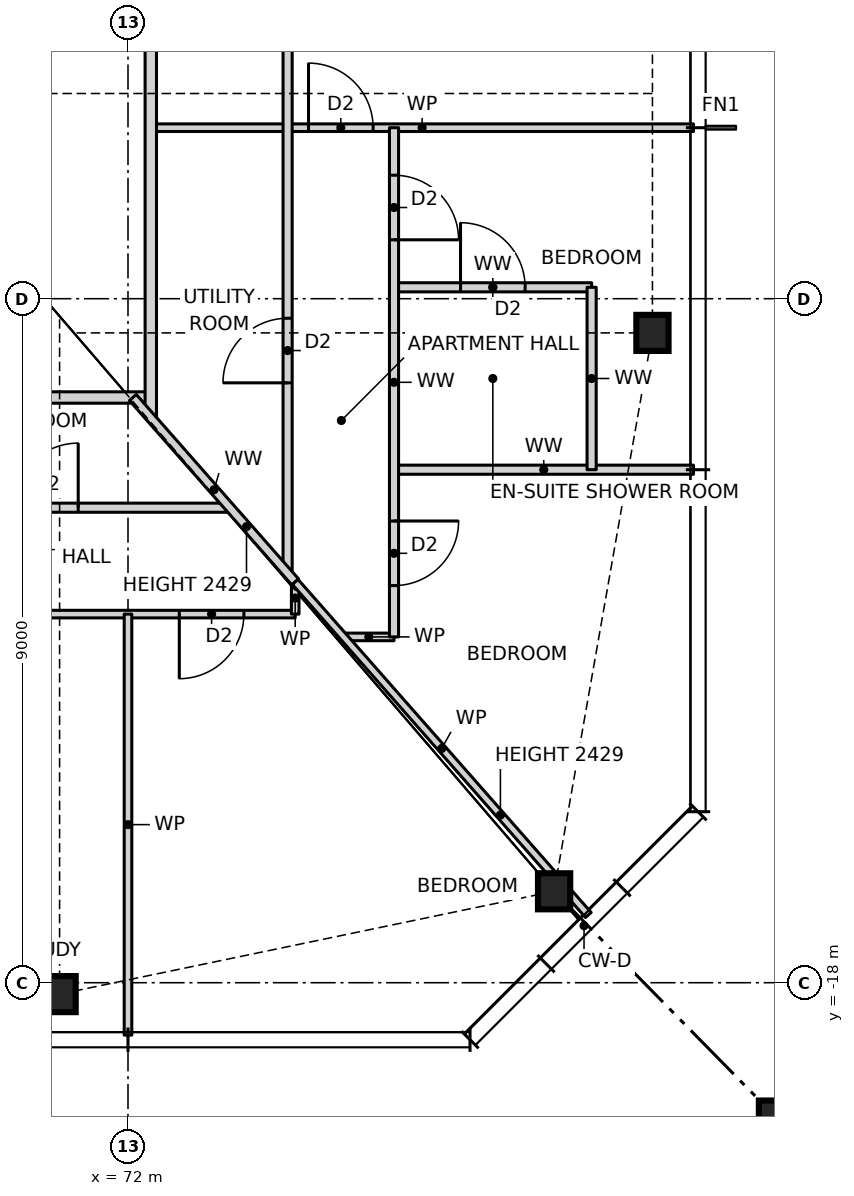
"""IFC4 building model, lengths in metres.
Left out: names, types, materials, properties, quantities, classifications, styles, units other than length and angle.
Written with IfcOpenShell. Run it as: python <this file> out.ifc"""

import sys

from ifc_helpers import new_model, si_unit, direction, frame, frame_2d, origin, origin_2d, place, context, subcontext, project, spatial, rectangle, hollow_rectangle, i_section, extrude, element, fill, save


model = new_model("IFC4")
c1 = context("Model", 3, precision=1e-05, world=origin(), true_north=direction((0.0, 1.0)))
c2 = subcontext(c1, "Body", "Model", "MODEL_VIEW")
j1 = project(units=[si_unit("LENGTHUNIT", "METRE"), si_unit("PLANEANGLEUNIT", "RADIAN")], contexts=[c1])
p1 = place(None, origin())
s1 = spatial("IfcSite", under=j1, at=p1, CompositionType="ELEMENT")
p2 = place(p1, origin())
s2 = spatial("IfcBuilding", under=s1, at=p2, CompositionType="ELEMENT")
p3 = place(p2, frame((0.0, 0.0, 25.5)))
s3 = spatial("IfcBuildingStorey", under=s2, at=p3, CompositionType="ELEMENT", Elevation=25.5)
for number, where, z_axis, x_axis in (
    (1, (71.1, -18.15, 0.0), (0.0, 0.0, 1.0), (1.0, 0.0, 0.0)),
    (2, (77.606, -16.797, 0.0), (0.0, 0.0, 1.0), (1.0, 0.0, 0.0)),
    (3, (78.9, -9.45, 0.0), (0.0, 0.0, 1.0), (1.0, 0.0, 0.0)),
):
    element("IfcColumn", number, at=place(p3, frame(where, z_axis=z_axis, x_axis=x_axis)), inside=s3, PredefinedType="COLUMN", context=c2, shape_type="SweptSolid", body=[
        extrude(i_section(OverallWidth=0.424, OverallDepth=0.475, WebThickness=0.048, FlangeThickness=0.077, at=origin_2d()), origin(), (0.0, 0.0, 1.0), 3.5),
    ])
p4 = place(p3, frame((80.9, -20.15, 0.0), z_axis=(0.0, 0.0, 1.0), x_axis=(1.0, 0.0, 0.0)))
e4 = element("IfcColumn", 4, at=p4, inside=s3, PredefinedType="COLUMN", context=c2, shape_type="SweptSolid", body=[
    extrude(hollow_rectangle(XDim=1.2, YDim=1.2, WallThickness=0.07, at=origin_2d()), origin(), (0.0, 0.0, 1.0), 3.5),
])
p5 = place(p3, frame((74.836, -13.45, 0.0), z_axis=(0.0, 0.0, 1.0), x_axis=(1.0, 0.0, 0.0)))
e5 = element("IfcWall", 5, at=p5, inside=s3, PredefinedType="PARTITIONING", context=c2, shape_type="SweptSolid", body=[
    extrude(rectangle(XDim=0.664, YDim=0.1, at=frame_2d((0.332, 0.0))), origin(), (0.0, 0.0, 1.0), 3.27),
])
p6 = place(p3, frame((63.0, -13.15, 0.0), z_axis=(0.0, 0.0, 1.0), x_axis=(1.0, 0.0, 0.0)))
e6 = element("IfcWall", 6, at=p6, inside=s3, PredefinedType="PARTITIONING", context=c2, shape_type="SweptSolid", body=[
    extrude(rectangle(XDim=11.2, YDim=0.1, at=frame_2d((5.6, 0.0))), origin(), (0.0, 0.0, 1.0), 3.27),
])
p7 = place(p6, frame((1.825, 0.0, 0.0)))
e7 = element("IfcOpeningElement", 7, at=p7, cuts=e6, PredefinedType="OPENING", context=c2, shape_type="SweptSolid", body=[
    extrude(rectangle(XDim=0.85, YDim=2.1, at=frame_2d((0.425, 1.05))), frame((0.0, 0.06, 0.0), z_axis=(0.0, -1.0, 0.0), x_axis=(1.0, 0.0, 0.0)), (0.0, 0.0, 1.0), 0.12),
])
p8 = place(p6, frame((6.325, 0.0, 0.0)))
e8 = element("IfcOpeningElement", 8, at=p8, cuts=e6, PredefinedType="OPENING", context=c2, shape_type="SweptSolid", body=[
    extrude(rectangle(XDim=0.85, YDim=2.1, at=frame_2d((0.425, 1.05))), frame((0.0, 0.06, 0.0), z_axis=(0.0, -1.0, 0.0), x_axis=(1.0, 0.0, 0.0)), (0.0, 0.0, 1.0), 0.12),
])
p9 = place(p6, frame((9.675, 0.0, 0.0)))
e9 = element("IfcOpeningElement", 9, at=p9, cuts=e6, PredefinedType="OPENING", context=c2, shape_type="SweptSolid", body=[
    extrude(rectangle(XDim=0.85, YDim=2.1, at=frame_2d((0.425, 1.05))), frame((0.0, 0.06, 0.0), z_axis=(0.0, -1.0, 0.0), x_axis=(1.0, 0.0, 0.0)), (0.0, 0.0, 1.0), 0.12),
])
p10 = place(p3, frame((54.0, -11.75, 0.0), z_axis=(0.0, 0.0, 1.0), x_axis=(1.0, 0.0, 0.0)))
e10 = element("IfcWall", 10, at=p10, inside=s3, PredefinedType="PARTITIONING", context=c2, shape_type="SweptSolid", body=[
    extrude(rectangle(XDim=19.34, YDim=0.12, at=frame_2d((9.67, 0.0))), origin(), (0.0, 0.0, 1.0), 3.27),
])
p11 = place(p10, frame((1.375, 0.0, 0.0)))
e11 = element("IfcOpeningElement", 11, at=p11, cuts=e10, PredefinedType="OPENING", context=c2, shape_type="SweptSolid", body=[
    extrude(rectangle(XDim=0.85, YDim=2.1, at=frame_2d((0.425, 1.05))), frame((0.0, 0.07, 0.0), z_axis=(0.0, -1.0, 0.0), x_axis=(1.0, 0.0, 0.0)), (0.0, 0.0, 1.0), 0.14),
])
p12 = place(p10, frame((4.575, 0.0, 0.0)))
e12 = element("IfcOpeningElement", 12, at=p12, cuts=e10, PredefinedType="OPENING", context=c2, shape_type="SweptSolid", body=[
    extrude(rectangle(XDim=0.85, YDim=2.1, at=frame_2d((0.425, 1.05))), frame((0.0, 0.07, 0.0), z_axis=(0.0, -1.0, 0.0), x_axis=(1.0, 0.0, 0.0)), (0.0, 0.0, 1.0), 0.14),
])
p13 = place(p10, frame((11.325, 0.0, 0.0)))
e13 = element("IfcOpeningElement", 13, at=p13, cuts=e10, PredefinedType="OPENING", context=c2, shape_type="SweptSolid", body=[
    extrude(rectangle(XDim=0.85, YDim=2.1, at=frame_2d((0.425, 1.05))), frame((0.0, 0.07, 0.0), z_axis=(0.0, -1.0, 0.0), x_axis=(1.0, 0.0, 0.0)), (0.0, 0.0, 1.0), 0.14),
])
p14 = place(p10, frame((16.495, 0.0, 0.0)))
e14 = element("IfcOpeningElement", 14, at=p14, cuts=e10, PredefinedType="OPENING", context=c2, shape_type="SweptSolid", body=[
    extrude(rectangle(XDim=0.85, YDim=2.1, at=frame_2d((0.425, 1.05))), frame((0.0, 0.07, 0.0), z_axis=(0.0, -1.0, 0.0), x_axis=(1.0, 0.0, 0.0)), (0.0, 0.0, 1.0), 0.14),
])
p15 = place(p3, frame((75.5, -11.25, 0.0), z_axis=(0.0, 0.0, 1.0), x_axis=(1.0, 0.0, 0.0)))
e15 = element("IfcWall", 15, at=p15, inside=s3, PredefinedType="PARTITIONING", context=c2, shape_type="SweptSolid", body=[
    extrude(rectangle(XDim=3.94, YDim=0.12, at=frame_2d((1.97, 0.0))), origin(), (0.0, 0.0, 1.0), 3.27),
])
p16 = place(p3, frame((53.7, -10.3, 0.0), z_axis=(0.0, 0.0, 1.0), x_axis=(1.0, 0.0, 0.0)))
e16 = element("IfcWall", 16, at=p16, inside=s3, PredefinedType="PARTITIONING", context=c2, shape_type="SweptSolid", body=[
    extrude(rectangle(XDim=18.6, YDim=0.15, at=frame_2d((9.3, 0.0))), origin(), (0.0, 0.0, 1.0), 3.27),
])
p17 = place(p16, frame((4.8, 0.0, 0.0)))
e17 = element("IfcOpeningElement", 17, at=p17, cuts=e16, PredefinedType="OPENING", context=c2, shape_type="SweptSolid", body=[
    extrude(rectangle(XDim=1.0, YDim=2.1, at=frame_2d((0.5, 1.05))), frame((0.0, 0.085, 0.0), z_axis=(0.0, -1.0, 0.0), x_axis=(1.0, 0.0, 0.0)), (0.0, 0.0, 1.0), 0.17),
])
p18 = place(p3, frame((75.5, -8.85, 0.0), z_axis=(0.0, 0.0, 1.0), x_axis=(1.0, 0.0, 0.0)))
e18 = element("IfcWall", 18, at=p18, inside=s3, PredefinedType="PARTITIONING", context=c2, shape_type="SweptSolid", body=[
    extrude(rectangle(XDim=2.6, YDim=0.12, at=frame_2d((1.3, 0.0))), origin(), (0.0, 0.0, 1.0), 3.27),
])
p19 = place(p18, frame((0.875, 0.0, 0.0)))
e19 = element("IfcOpeningElement", 19, at=p19, cuts=e18, PredefinedType="OPENING", context=c2, shape_type="SweptSolid", body=[
    extrude(rectangle(XDim=0.85, YDim=2.1, at=frame_2d((0.425, 1.05))), frame((0.0, 0.07, 0.0), z_axis=(0.0, -1.0, 0.0), x_axis=(1.0, 0.0, 0.0)), (0.0, 0.0, 1.0), 0.14),
])
p20 = place(p3, frame((72.3, -6.75, 0.0), z_axis=(0.0, 0.0, 1.0), x_axis=(1.0, 0.0, 0.0)))
e20 = element("IfcWall", 20, at=p20, inside=s3, PredefinedType="PARTITIONING", context=c2, shape_type="SweptSolid", body=[
    extrude(rectangle(XDim=7.14, YDim=0.1, at=frame_2d((3.57, 0.0))), origin(), (0.0, 0.0, 1.0), 3.27),
])
p21 = place(p20, frame((2.075, 0.0, 0.0)))
e21 = element("IfcOpeningElement", 21, at=p21, cuts=e20, PredefinedType="OPENING", context=c2, shape_type="SweptSolid", body=[
    extrude(rectangle(XDim=0.85, YDim=2.1, at=frame_2d((0.425, 1.05))), frame((0.0, 0.06, 0.0), z_axis=(0.0, -1.0, 0.0), x_axis=(1.0, 0.0, 0.0)), (0.0, 0.0, 1.0), 0.12),
])
p22 = place(p3, frame((78.1, -11.25, 0.0), z_axis=(0.0, 0.0, 1.0), x_axis=(0.0, 1.0, 0.0)))
e22 = element("IfcWall", 22, at=p22, inside=s3, PredefinedType="PARTITIONING", context=c2, shape_type="SweptSolid", body=[
    extrude(rectangle(XDim=2.4, YDim=0.12, at=frame_2d((1.2, 0.0))), origin(), (0.0, 0.0, 1.0), 3.27),
])
p23 = place(p3, frame((75.5, -13.45, 0.0), z_axis=(0.0, 0.0, 1.0), x_axis=(0.0, 1.0, 0.0)))
e23 = element("IfcWall", 23, at=p23, inside=s3, PredefinedType="PARTITIONING", context=c2, shape_type="SweptSolid", body=[
    extrude(rectangle(XDim=6.7, YDim=0.12, at=frame_2d((3.35, 0.0))), origin(), (0.0, 0.0, 1.0), 3.27),
])
p24 = place(p23, frame((5.225, 0.0, 0.0)))
e24 = element("IfcOpeningElement", 24, at=p24, cuts=e23, PredefinedType="OPENING", context=c2, shape_type="SweptSolid", body=[
    extrude(rectangle(XDim=0.85, YDim=2.1, at=frame_2d((0.425, 1.05))), frame((0.0, 0.07, 0.0), z_axis=(0.0, -1.0, 0.0), x_axis=(1.0, 0.0, 0.0)), (0.0, 0.0, 1.0), 0.14),
])
p25 = place(p23, frame((0.675, 0.0, 0.0)))
e25 = element("IfcOpeningElement", 25, at=p25, cuts=e23, PredefinedType="OPENING", context=c2, shape_type="SweptSolid", body=[
    extrude(rectangle(XDim=0.85, YDim=2.1, at=frame_2d((0.425, 1.05))), frame((0.0, 0.07, 0.0), z_axis=(0.0, -1.0, 0.0), x_axis=(1.0, 0.0, 0.0)), (0.0, 0.0, 1.0), 0.14),
])
p26 = place(p3, frame((74.2, -13.15, 0.0), z_axis=(0.0, 0.0, 1.0), x_axis=(0.0, 1.0, 0.0)))
e26 = element("IfcWall", 26, at=p26, inside=s3, PredefinedType="PARTITIONING", context=c2, shape_type="SweptSolid", body=[
    extrude(rectangle(XDim=0.423, YDim=0.1, at=frame_2d((0.211, 0.0))), origin(), (0.0, 0.0, 1.0), 3.27),
])
p27 = place(p3, frame((74.1, -12.614, 0.0), z_axis=(0.0, 0.0, 1.0), x_axis=(0.0, 1.0, 0.0)))
e27 = element("IfcWall", 27, at=p27, inside=s3, PredefinedType="PARTITIONING", context=c2, shape_type="SweptSolid", body=[
    extrude(rectangle(XDim=25.228, YDim=0.12, at=frame_2d((12.614, 0.0))), origin(), (0.0, 0.0, 1.0), 3.27),
])
p28 = place(p27, frame((7.239, 0.0, 0.0)))
e28 = element("IfcOpeningElement", 28, at=p28, cuts=e27, PredefinedType="OPENING", context=c2, shape_type="SweptSolid", body=[
    extrude(rectangle(XDim=0.85, YDim=2.1, at=frame_2d((0.425, 1.05))), frame((0.0, 0.07, 0.0), z_axis=(0.0, -1.0, 0.0), x_axis=(1.0, 0.0, 0.0)), (0.0, 0.0, 1.0), 0.14),
])
p29 = place(p27, frame((10.439, 0.0, 0.0)))
e29 = element("IfcOpeningElement", 29, at=p29, cuts=e27, PredefinedType="OPENING", context=c2, shape_type="SweptSolid", body=[
    extrude(rectangle(XDim=0.85, YDim=2.1, at=frame_2d((0.425, 1.05))), frame((0.0, 0.07, 0.0), z_axis=(0.0, -1.0, 0.0), x_axis=(1.0, 0.0, 0.0)), (0.0, 0.0, 1.0), 0.14),
])
p30 = place(p27, frame((2.507, 0.0, 0.0)))
e30 = element("IfcOpeningElement", 30, at=p30, cuts=e27, PredefinedType="OPENING", context=c2, shape_type="SweptSolid", body=[
    extrude(rectangle(XDim=0.85, YDim=2.1, at=frame_2d((0.425, 1.05))), frame((0.0, 0.07, 0.0), z_axis=(0.0, -1.0, 0.0), x_axis=(1.0, 0.0, 0.0)), (0.0, 0.0, 1.0), 0.14),
])
p31 = place(p27, frame((16.639, 0.0, 0.0)))
e31 = element("IfcOpeningElement", 31, at=p31, cuts=e27, PredefinedType="OPENING", context=c2, shape_type="SweptSolid", body=[
    extrude(rectangle(XDim=0.85, YDim=2.1, at=frame_2d((0.425, 1.05))), frame((0.0, 0.07, 0.0), z_axis=(0.0, -1.0, 0.0), x_axis=(1.0, 0.0, 0.0)), (0.0, 0.0, 1.0), 0.14),
])
p32 = place(p27, frame((21.821, 0.0, 0.0)))
e32 = element("IfcOpeningElement", 32, at=p32, cuts=e27, PredefinedType="OPENING", context=c2, shape_type="SweptSolid", body=[
    extrude(rectangle(XDim=0.85, YDim=2.1, at=frame_2d((0.425, 1.05))), frame((0.0, 0.07, 0.0), z_axis=(0.0, -1.0, 0.0), x_axis=(1.0, 0.0, 0.0)), (0.0, 0.0, 1.0), 0.14),
])
p33 = place(p3, frame((72.3, -10.568, 0.0), z_axis=(0.0, 0.0, 1.0), x_axis=(0.0, 1.0, 0.0)))
e33 = element("IfcWall", 33, at=p33, inside=s3, PredefinedType="PARTITIONING", context=c2, shape_type="SweptSolid", body=[
    extrude(rectangle(XDim=21.136, YDim=0.15, at=frame_2d((10.568, 0.0))), origin(), (0.0, 0.0, 1.0), 3.27),
])
p34 = place(p33, frame((8.318, 0.0, 0.0)))
e34 = element("IfcOpeningElement", 34, at=p34, cuts=e33, PredefinedType="OPENING", context=c2, shape_type="SweptSolid", body=[
    extrude(rectangle(XDim=1.0, YDim=2.1, at=frame_2d((0.5, 1.05))), frame((0.0, 0.085, 0.0), z_axis=(0.0, -1.0, 0.0), x_axis=(1.0, 0.0, 0.0)), (0.0, 0.0, 1.0), 0.17),
])
p35 = place(p3, frame((72.0, -18.69, 0.0), z_axis=(0.0, 0.0, 1.0), x_axis=(0.0, 1.0, 0.0)))
e35 = element("IfcWall", 35, at=p35, inside=s3, PredefinedType="PARTITIONING", context=c2, shape_type="SweptSolid", body=[
    extrude(rectangle(XDim=5.54, YDim=0.1, at=frame_2d((2.77, 0.0))), origin(), (0.0, 0.0, 1.0), 3.27),
])
p36 = place(p3, frame((74.2, -12.727, 0.0), z_axis=(0.0, 0.0, 1.0), x_axis=(-0.660667046586, 0.75067906162, 0.0)))
e36 = element("IfcWall", 36, at=p36, inside=s3, PredefinedType="PARTITIONING", context=c2, shape_type="SweptSolid", body=[
    extrude(rectangle(XDim=3.233, YDim=0.12, at=frame_2d((1.617, 0.0))), origin(), (0.0, 0.0, 1.0), 2.429),
])
p37 = place(p3, frame((78.057, -17.109, 0.0), z_axis=(0.0, 0.0, 1.0), x_axis=(-0.660698595885, 0.750651294141, 0.0)))
e37 = element("IfcWall", 37, at=p37, inside=s3, PredefinedType="PARTITIONING", context=c2, shape_type="SweptSolid", body=[
    extrude(rectangle(XDim=5.838, YDim=0.1, at=frame_2d((2.919, 0.0))), origin(), (0.0, 0.0, 1.0), 2.429),
])
p38 = place(p9, frame((0.85, 0.0, 0.0), z_axis=(0.0, 0.0, 1.0), x_axis=(-1.0, 0.0, 0.0)))
e38 = element("IfcDoor", 38, at=p38, inside=s3, OperationType="SINGLE_SWING_RIGHT", PredefinedType="DOOR", context=c2, shape_type="SweptSolid", body=[
    extrude(rectangle(XDim=0.85, YDim=2.1, at=frame_2d((0.425, 1.05))), frame((0.0, 0.025, 0.0), z_axis=(0.0, -1.0, 0.0), x_axis=(1.0, 0.0, 0.0)), (0.0, 0.0, 1.0), 0.05),
])
fill(e9, e38)
p39 = place(p14, origin())
e39 = element("IfcDoor", 39, at=p39, inside=s3, OperationType="SINGLE_SWING_RIGHT", PredefinedType="DOOR", context=c2, shape_type="SweptSolid", body=[
    extrude(rectangle(XDim=0.85, YDim=2.1, at=frame_2d((0.425, 1.05))), frame((0.0, 0.025, 0.0), z_axis=(0.0, -1.0, 0.0), x_axis=(1.0, 0.0, 0.0)), (0.0, 0.0, 1.0), 0.05),
])
fill(e14, e39)
p40 = place(p21, origin())
e40 = element("IfcDoor", 40, at=p40, inside=s3, OperationType="SINGLE_SWING_LEFT", PredefinedType="DOOR", context=c2, shape_type="SweptSolid", body=[
    extrude(rectangle(XDim=0.85, YDim=2.1, at=frame_2d((0.425, 1.05))), frame((0.0, 0.025, 0.0), z_axis=(0.0, -1.0, 0.0), x_axis=(1.0, 0.0, 0.0)), (0.0, 0.0, 1.0), 0.05),
])
fill(e21, e40)
p41 = place(p19, origin())
e41 = element("IfcDoor", 41, at=p41, inside=s3, OperationType="SINGLE_SWING_LEFT", PredefinedType="DOOR", context=c2, shape_type="SweptSolid", body=[
    extrude(rectangle(XDim=0.85, YDim=2.1, at=frame_2d((0.425, 1.05))), frame((0.0, 0.025, 0.0), z_axis=(0.0, -1.0, 0.0), x_axis=(1.0, 0.0, 0.0)), (0.0, 0.0, 1.0), 0.05),
])
fill(e19, e41)
p42 = place(p24, frame((0.85, 0.0, 0.0), z_axis=(0.0, 0.0, 1.0), x_axis=(-1.0, 0.0, 0.0)))
e42 = element("IfcDoor", 42, at=p42, inside=s3, OperationType="SINGLE_SWING_RIGHT", PredefinedType="DOOR", context=c2, shape_type="SweptSolid", body=[
    extrude(rectangle(XDim=0.85, YDim=2.1, at=frame_2d((0.425, 1.05))), frame((0.0, 0.025, 0.0), z_axis=(0.0, -1.0, 0.0), x_axis=(1.0, 0.0, 0.0)), (0.0, 0.0, 1.0), 0.05),
])
fill(e24, e42)
p43 = place(p25, frame((0.85, 0.0, 0.0), z_axis=(0.0, 0.0, 1.0), x_axis=(-1.0, 0.0, 0.0)))
e43 = element("IfcDoor", 43, at=p43, inside=s3, OperationType="SINGLE_SWING_LEFT", PredefinedType="DOOR", context=c2, shape_type="SweptSolid", body=[
    extrude(rectangle(XDim=0.85, YDim=2.1, at=frame_2d((0.425, 1.05))), frame((0.0, 0.025, 0.0), z_axis=(0.0, -1.0, 0.0), x_axis=(1.0, 0.0, 0.0)), (0.0, 0.0, 1.0), 0.05),
])
fill(e25, e43)
p44 = place(p30, origin())
e44 = element("IfcDoor", 44, at=p44, inside=s3, OperationType="SINGLE_SWING_LEFT", PredefinedType="DOOR", context=c2, shape_type="SweptSolid", body=[
    extrude(rectangle(XDim=0.85, YDim=2.1, at=frame_2d((0.425, 1.05))), frame((0.0, 0.025, 0.0), z_axis=(0.0, -1.0, 0.0), x_axis=(1.0, 0.0, 0.0)), (0.0, 0.0, 1.0), 0.05),
])
fill(e30, e44)
save(model, sys.argv[1])
